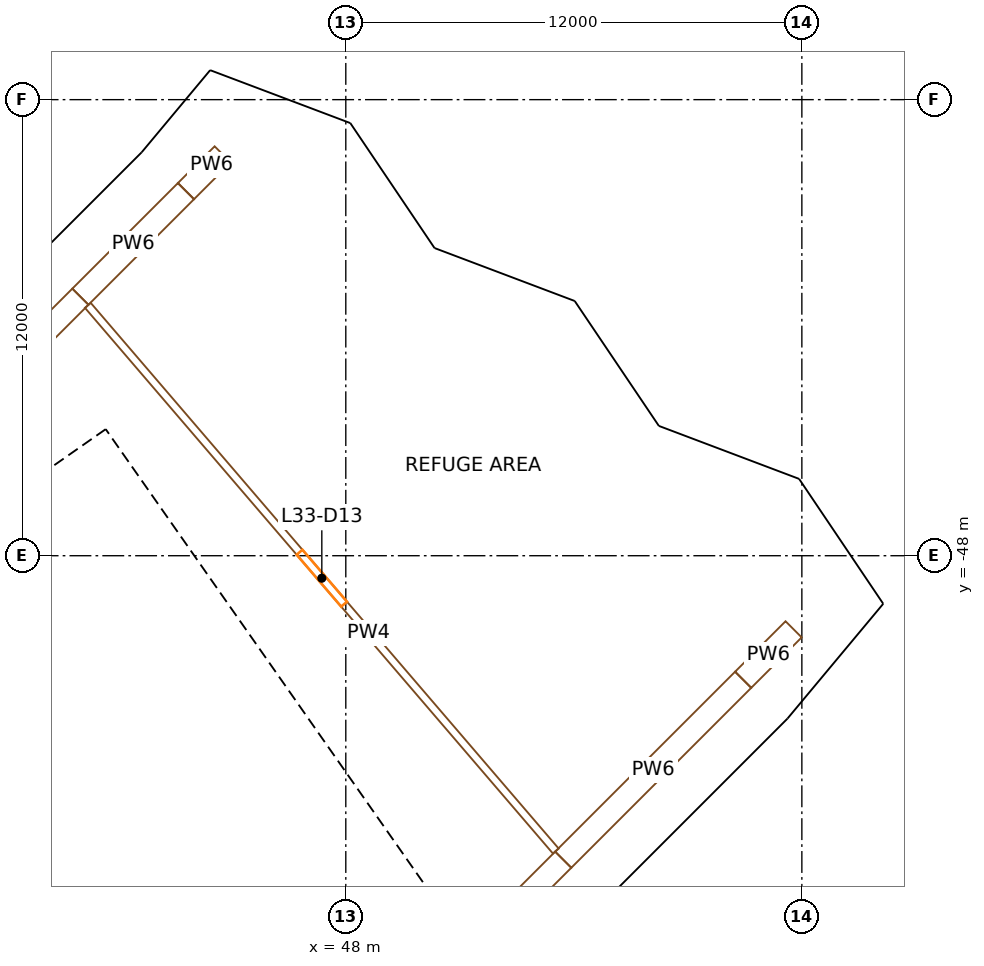
"""IFC4 building model, lengths in metres.
Left out: names, types, materials, properties, quantities, classifications, styles, units other than length and angle.
Written with IfcOpenShell. Run it as: python <this file> out.ifc"""

import sys

from ifc_helpers import new_model, si_unit, direction, frame, frame_2d, origin, origin_2d, place, context, subcontext, project, spatial, rectangle, extrude, element, fill, save


model = new_model("IFC4")
c1 = context("Model", 3, precision=1e-05, world=origin(), true_north=direction((0.0, 1.0)))
c2 = subcontext(c1, "Body", "Model", "MODEL_VIEW")
j1 = project(units=[si_unit("LENGTHUNIT", "METRE"), si_unit("PLANEANGLEUNIT", "RADIAN")], contexts=[c1])
p1 = place(None, origin())
s1 = spatial("IfcSite", under=j1, at=p1, CompositionType="ELEMENT")
p2 = place(p1, origin())
s2 = spatial("IfcBuilding", under=s1, at=p2, CompositionType="ELEMENT")
p3 = place(p2, frame((0.0, 0.0, 144.3)))
s3 = spatial("IfcBuildingStorey", under=s2, at=p3, CompositionType="ELEMENT", Elevation=144.3)
for number, where, z_axis, x_axis in (
    (1, (43.795, -38.407, 0.0), (0.0, 0.0, 1.0), (0.659, 0.752, 0.0)),
    (2, (58.456, -51.264, 0.0), (0.0, 0.0, 1.0), (0.659, 0.752, 0.0)),
):
    element("IfcColumn", number, at=place(p3, frame(where, z_axis=z_axis, x_axis=x_axis)), inside=s3, PredefinedType="COLUMN", context=c2, shape_type="SweptSolid", body=[
        extrude(rectangle(XDim=1.2, YDim=1.5, at=origin_2d()), origin(), (0.0, 0.0, 1.0), 5.0),
    ])
p4 = place(p3, frame((49.779, -57.191, 0.0), z_axis=(0.0, 0.0, 1.0), x_axis=(-0.573577477574, 0.819151315216, 0.0)))
e3 = element("IfcWall", 3, at=p4, inside=s3, PredefinedType="SHEAR", context=c2, shape_type="SweptSolid", body=[
    extrude(rectangle(XDim=14.8, YDim=0.9, at=frame_2d((7.4, 0.0))), origin(), (0.0, 0.0, 1.0), 4.7),
])
p5 = place(p4, frame((6.7, 0.0, 0.0)))
e4 = element("IfcOpeningElement", 4, at=p5, cuts=e3, PredefinedType="OPENING", context=c2, shape_type="SweptSolid", body=[
    extrude(rectangle(XDim=1.4, YDim=2.1, at=frame_2d((0.7, 1.05))), frame((0.0, 0.46, 0.0), z_axis=(0.0, -1.0, 0.0), x_axis=(1.0, 0.0, 0.0)), (0.0, 0.0, 1.0), 0.92),
])
p6 = place(p3, frame((28.854, -54.324, 0.0), z_axis=(0.0, 0.0, 1.0), x_axis=(0.819145767589, 0.573585400304, 0.0)))
e5 = element("IfcWall", 5, at=p6, inside=s3, PredefinedType="SHEAR", context=c2, shape_type="SweptSolid", body=[
    extrude(rectangle(XDim=15.045, YDim=0.9, at=frame_2d((7.523, 0.0))), origin(), (0.0, 0.0, 1.0), 4.7),
])
p7 = place(p6, frame((3.45, 0.0, 0.0)))
e6 = element("IfcOpeningElement", 6, at=p7, cuts=e5, PredefinedType="OPENING", context=c2, shape_type="SweptSolid", body=[
    extrude(rectangle(XDim=1.0, YDim=2.1, at=frame_2d((0.5, 1.05))), frame((0.0, 0.46, 0.0), z_axis=(0.0, -1.0, 0.0), x_axis=(1.0, 0.0, 0.0)), (0.0, 0.0, 1.0), 0.92),
])
p8 = place(p6, frame((13.495, 0.0, 0.0)))
e7 = element("IfcOpeningElement", 7, at=p8, cuts=e5, PredefinedType="OPENING", context=c2, shape_type="SweptSolid", body=[
    extrude(rectangle(XDim=1.1, YDim=2.1, at=frame_2d((0.55, 1.05))), frame((0.0, 0.46, 0.0), z_axis=(0.0, -1.0, 0.0), x_axis=(1.0, 0.0, 0.0)), (0.0, 0.0, 1.0), 0.92),
])
p9 = place(p3, frame((43.204, -60.696, 0.0), z_axis=(0.0, 0.0, 1.0), x_axis=(-0.573571992966, 0.819155155563, 0.0)))
e8 = element("IfcWall", 8, at=p9, inside=s3, PredefinedType="SOLIDWALL", context=c2, shape_type="SweptSolid", body=[
    extrude(rectangle(XDim=13.0, YDim=0.3, at=frame_2d((6.5, 0.0))), origin(), (0.0, 0.0, 1.0), 4.7),
])
p10 = place(p3, frame((38.17, -58.3, 0.0), z_axis=(0.0, 0.0, 1.0), x_axis=(0.819178980414, 0.573537965655, 0.0)))
e9 = element("IfcWall", 9, at=p10, inside=s3, PredefinedType="SOLIDWALL", context=c2, shape_type="SweptSolid", body=[
    extrude(rectangle(XDim=2.6, YDim=0.3, at=frame_2d((1.3, 0.0))), origin(), (0.0, 0.0, 1.0), 4.7),
])
p11 = place(p3, frame((37.936, -52.91, 0.0), z_axis=(0.0, 0.0, 1.0), x_axis=(0.819147518138, 0.57358290031, 0.0)))
e10 = element("IfcWall", 10, at=p11, inside=s3, PredefinedType="SOLIDWALL", context=c2, shape_type="SweptSolid", body=[
    extrude(rectangle(XDim=6.795, YDim=0.3, at=frame_2d((3.398, 0.0))), origin(), (0.0, 0.0, 1.0), 4.7),
])
p12 = place(p11, frame((5.32, 0.0, 0.0)))
e11 = element("IfcOpeningElement", 11, at=p12, cuts=e10, PredefinedType="OPENING", context=c2, shape_type="SweptSolid", body=[
    extrude(rectangle(XDim=1.1, YDim=2.1, at=frame_2d((0.55, 1.05))), frame((0.0, 0.16, 0.0), z_axis=(0.0, -1.0, 0.0), x_axis=(1.0, 0.0, 0.0)), (0.0, 0.0, 1.0), 0.32),
])
p13 = place(p3, frame((41.262, -57.661, 0.0), z_axis=(0.0, 0.0, 1.0), x_axis=(0.819164398642, 0.573558792102, 0.0)))
e12 = element("IfcWall", 12, at=p13, inside=s3, PredefinedType="SOLIDWALL", context=c2, shape_type="SweptSolid", body=[
    extrude(rectangle(XDim=6.795, YDim=0.3, at=frame_2d((3.397, 0.0))), origin(), (0.0, 0.0, 1.0), 4.7),
])
p14 = place(p13, frame((5.32, 0.0, 0.0)))
e13 = element("IfcOpeningElement", 13, at=p14, cuts=e12, PredefinedType="OPENING", context=c2, shape_type="SweptSolid", body=[
    extrude(rectangle(XDim=1.1, YDim=2.1, at=frame_2d((0.55, 1.05))), frame((0.0, 0.16, 0.0), z_axis=(0.0, -1.0, 0.0), x_axis=(1.0, 0.0, 0.0)), (0.0, 0.0, 1.0), 0.32),
])
p15 = place(p3, frame((39.599, -55.285, 0.0), z_axis=(0.0, 0.0, 1.0), x_axis=(0.819136323161, 0.573598887793, 0.0)))
e14 = element("IfcWall", 14, at=p15, inside=s3, PredefinedType="SOLIDWALL", context=c2, shape_type="SweptSolid", body=[
    extrude(rectangle(XDim=3.0, YDim=0.5, at=frame_2d((1.5, 0.0))), origin(), (0.0, 0.0, 1.0), 4.7),
])
p16 = place(p3, frame((43.757, -55.731, 0.0), z_axis=(0.0, 0.0, 1.0), x_axis=(-0.573536818435, 0.819179783625, 0.0)))
e15 = element("IfcWall", 15, at=p16, inside=s3, PredefinedType="SOLIDWALL", context=c2, shape_type="SweptSolid", body=[
    extrude(rectangle(XDim=5.5, YDim=0.3, at=frame_2d((2.75, 0.0))), origin(), (0.0, 0.0, 1.0), 4.7),
])
p17 = place(p16, frame((0.7, 0.0, 0.0)))
e16 = element("IfcOpeningElement", 16, at=p17, cuts=e15, PredefinedType="OPENING", context=c2, shape_type="SweptSolid", body=[
    extrude(rectangle(XDim=1.1, YDim=2.1, at=frame_2d((0.55, 1.05))), frame((0.0, 0.16, 0.0), z_axis=(0.0, -1.0, 0.0), x_axis=(1.0, 0.0, 0.0)), (0.0, 0.0, 1.0), 0.32),
])
p18 = place(p16, frame((3.7, 0.0, 0.0)))
e17 = element("IfcOpeningElement", 17, at=p18, cuts=e15, PredefinedType="OPENING", context=c2, shape_type="SweptSolid", body=[
    extrude(rectangle(XDim=1.1, YDim=2.1, at=frame_2d((0.55, 1.05))), frame((0.0, 0.16, 0.0), z_axis=(0.0, -1.0, 0.0), x_axis=(1.0, 0.0, 0.0)), (0.0, 0.0, 1.0), 0.32),
])
p19 = place(p3, frame((41.3, -47.96, 0.0), z_axis=(0.0, 0.0, 1.0), x_axis=(0.573495128918, -0.819208970354, 0.0)))
e18 = element("IfcWall", 18, at=p19, inside=s3, PredefinedType="SOLIDWALL", context=c2, shape_type="SweptSolid", body=[
    extrude(rectangle(XDim=0.5, YDim=0.3, at=frame_2d((0.25, 0.0))), origin(), (0.0, 0.0, 1.0), 2.3),
])
p20 = place(p3, frame((46.778, -55.782, 0.0), z_axis=(0.0, 0.0, 1.0), x_axis=(0.573822822947, -0.818979467304, 0.0)))
e19 = element("IfcWall", 19, at=p20, inside=s3, PredefinedType="SOLIDWALL", context=c2, shape_type="SweptSolid", body=[
    extrude(rectangle(XDim=0.5, YDim=0.3, at=frame_2d((0.25, 0.0))), origin(), (0.0, 0.0, 1.0), 2.3),
])
p21 = place(p3, frame((61.754, -49.049, 0.0), z_axis=(0.0, 0.0, 1.0), x_axis=(-0.558712749234, 0.82936123845, 0.0)))
e20 = element("IfcWall", 20, at=p21, inside=s3, PredefinedType="SOLIDWALL", context=c2, shape_type="SweptSolid", body=[
    extrude(rectangle(XDim=3.294, YDim=0.4, at=frame_2d((1.647, 0.0))), origin(), (0.0, 0.0, 1.0), 3.6),
])
p22 = place(p3, frame((59.905, -46.184, 0.0), z_axis=(0.0, 0.0, 1.0), x_axis=(-0.935475531187, 0.353391469266, 0.0)))
e21 = element("IfcWall", 21, at=p22, inside=s3, PredefinedType="SOLIDWALL", context=c2, shape_type="SweptSolid", body=[
    extrude(rectangle(XDim=4.174, YDim=0.4, at=frame_2d((2.087, 0.0))), origin(), (0.0, 0.0, 1.0), 3.6),
])
p23 = place(p3, frame((55.99, -44.576, 0.0), z_axis=(0.0, 0.0, 1.0), x_axis=(-0.558746380234, 0.829338581386, 0.0)))
e22 = element("IfcWall", 22, at=p23, inside=s3, PredefinedType="SOLIDWALL", context=c2, shape_type="SweptSolid", body=[
    extrude(rectangle(XDim=3.545, YDim=0.4, at=frame_2d((1.772, 0.0))), origin(), (0.0, 0.0, 1.0), 3.6),
])
p24 = place(p3, frame((54.0, -41.503, 0.0), z_axis=(0.0, 0.0, 1.0), x_axis=(-0.935511628749, 0.353295899319, 0.0)))
e23 = element("IfcWall", 23, at=p24, inside=s3, PredefinedType="SOLIDWALL", context=c2, shape_type="SweptSolid", body=[
    extrude(rectangle(XDim=4.173, YDim=0.4, at=frame_2d((2.086, 0.0))), origin(), (0.0, 0.0, 1.0), 3.6),
])
p25 = place(p3, frame((50.087, -39.896, 0.0), z_axis=(0.0, 0.0, 1.0), x_axis=(-0.558808176672, 0.829296944215, 0.0)))
e24 = element("IfcWall", 24, at=p25, inside=s3, PredefinedType="SOLIDWALL", context=c2, shape_type="SweptSolid", body=[
    extrude(rectangle(XDim=3.546, YDim=0.4, at=frame_2d((1.773, 0.0))), origin(), (0.0, 0.0, 1.0), 3.6),
])
p26 = place(p3, frame((48.096, -36.822, 0.0), z_axis=(0.0, 0.0, 1.0), x_axis=(-0.93554220832, 0.353214915386, 0.0)))
e25 = element("IfcWall", 25, at=p26, inside=s3, PredefinedType="SOLIDWALL", context=c2, shape_type="SweptSolid", body=[
    extrude(rectangle(XDim=4.041, YDim=0.4, at=frame_2d((2.021, 0.0))), origin(), (0.0, 0.0, 1.0), 3.6),
])
p27 = place(p3, frame((42.791, -37.506, 0.0), z_axis=(0.0, 0.0, 1.0), x_axis=(-0.707123092197, -0.7070904698, 0.0)))
e26 = element("IfcWall", 26, at=p27, inside=s3, PredefinedType="SOLIDWALL", context=c2, shape_type="SweptSolid", body=[
    extrude(rectangle(XDim=7.484, YDim=0.4, at=frame_2d((3.742, 0.0))), origin(), (0.0, 0.0, 1.0), 3.6),
])
p28 = place(p3, frame((44.333, -35.655, 0.0), z_axis=(0.0, 0.0, 1.0), x_axis=(-0.640465546818, -0.767986903104, 0.0)))
e27 = element("IfcWall", 27, at=p28, inside=s3, PredefinedType="SOLIDWALL", context=c2, shape_type="SweptSolid", body=[
    extrude(rectangle(XDim=2.391, YDim=0.4, at=frame_2d((1.196, 0.0))), origin(), (0.0, 0.0, 1.0), 3.6),
])
p29 = place(p3, frame((52.19, -59.434, 0.0), z_axis=(0.0, 0.0, 1.0), x_axis=(0.707094885943, 0.70711867623, 0.0)))
e28 = element("IfcWall", 28, at=p29, inside=s3, PredefinedType="SOLIDWALL", context=c2, shape_type="SweptSolid", body=[
    extrude(rectangle(XDim=10.262, YDim=0.4, at=frame_2d((5.131, 0.0))), origin(), (0.0, 0.0, 1.0), 3.6),
])
p30 = place(p3, frame((59.46, -52.167, 0.0), z_axis=(0.0, 0.0, 1.0), x_axis=(0.640521763301, 0.767940017669, 0.0)))
e29 = element("IfcWall", 29, at=p30, inside=s3, PredefinedType="SOLIDWALL", context=c2, shape_type="SweptSolid", body=[
    extrude(rectangle(XDim=3.985, YDim=0.4, at=frame_2d((1.993, 0.0))), origin(), (0.0, 0.0, 1.0), 3.6),
])
p31 = place(p3, frame((38.423, -43.779, 0.0), z_axis=(0.0, 0.0, 1.0), x_axis=(0.707106781187, 0.707106781187, 0.0)))
e30 = element("IfcWall", 30, at=p31, inside=s3, PredefinedType="PARTITIONING", context=c2, shape_type="SweptSolid", body=[
    extrude(rectangle(XDim=3.668, YDim=0.6, at=frame_2d((1.834, 0.0))), origin(), (0.0, 0.0, 1.0), 3.6),
])
p32 = place(p3, frame((41.017, -41.185, 0.0), z_axis=(0.0, 0.0, 1.0), x_axis=(0.707106781187, 0.707106781187, 0.0)))
e31 = element("IfcWall", 31, at=p32, inside=s3, PredefinedType="PARTITIONING", context=c2, shape_type="SweptSolid", body=[
    extrude(rectangle(XDim=3.925, YDim=0.6, at=frame_2d((1.963, 0.0))), origin(), (0.0, 0.0, 1.0), 3.6),
])
p33 = place(p3, frame((41.212, -41.412, 0.0), z_axis=(0.0, 0.0, 1.0), x_axis=(0.650990118882, -0.75908620401, 0.0)))
e32 = element("IfcWall", 32, at=p33, inside=s3, PredefinedType="PARTITIONING", context=c2, shape_type="SweptSolid", body=[
    extrude(rectangle(XDim=18.915, YDim=0.2, at=frame_2d((9.458, 0.0))), origin(), (0.0, 0.0, 1.0), 3.6),
])
p34 = place(p33, frame((8.558, 0.0, 0.0)))
e33 = element("IfcOpeningElement", 33, at=p34, cuts=e32, PredefinedType="OPENING", context=c2, shape_type="SweptSolid", body=[
    extrude(rectangle(XDim=1.8, YDim=2.4, at=frame_2d((0.9, 1.2))), frame((0.0, 0.11, 0.0), z_axis=(0.0, -1.0, 0.0), x_axis=(1.0, 0.0, 0.0)), (0.0, 0.0, 1.0), 0.22),
])
p35 = place(p3, frame((43.797, -38.405, 0.0), z_axis=(0.0, 0.0, 1.0), x_axis=(0.707106781187, 0.707106781187, 0.0)))
e34 = element("IfcWall", 34, at=p35, inside=s3, PredefinedType="PARTITIONING", context=c2, shape_type="SweptSolid", body=[
    extrude(rectangle(XDim=1.364, YDim=0.6, at=frame_2d((0.682, 0.0))), origin(), (0.0, 0.0, 1.0), 3.6),
])
p36 = place(p3, frame((51.28, -58.439, 0.0), z_axis=(0.0, 0.0, 1.0), x_axis=(0.707106781187, 0.707106781187, 0.0)))
e35 = element("IfcWall", 35, at=p36, inside=s3, PredefinedType="PARTITIONING", context=c2, shape_type="SweptSolid", body=[
    extrude(rectangle(XDim=3.452, YDim=0.6, at=frame_2d((1.726, 0.0))), origin(), (0.0, 0.0, 1.0), 3.6),
])
p37 = place(p3, frame((53.721, -55.999, 0.0), z_axis=(0.0, 0.0, 1.0), x_axis=(0.707106781187, 0.707106781187, 0.0)))
e36 = element("IfcWall", 36, at=p37, inside=s3, PredefinedType="PARTITIONING", context=c2, shape_type="SweptSolid", body=[
    extrude(rectangle(XDim=6.692, YDim=0.6, at=frame_2d((3.346, 0.0))), origin(), (0.0, 0.0, 1.0), 3.6),
])
p38 = place(p3, frame((58.458, -51.262, 0.0), z_axis=(0.0, 0.0, 1.0), x_axis=(0.707041637073, 0.707171919299, 0.0)))
e37 = element("IfcWall", 37, at=p38, inside=s3, PredefinedType="PARTITIONING", context=c2, shape_type="SweptSolid", body=[
    extrude(rectangle(XDim=1.874, YDim=0.6, at=frame_2d((0.937, 0.0))), origin(), (0.0, 0.0, 1.0), 3.6),
])
p39 = place(p17, origin())
e38 = element("IfcDoor", 38, at=p39, inside=s3, OperationType="DOUBLE_DOOR_SLIDING", PredefinedType="DOOR", context=c2, shape_type="SweptSolid", body=[
    extrude(rectangle(XDim=1.1, YDim=2.1, at=frame_2d((0.55, 1.05))), frame((0.0, 0.025, 0.0), z_axis=(0.0, -1.0, 0.0), x_axis=(1.0, 0.0, 0.0)), (0.0, 0.0, 1.0), 0.05),
])
fill(e16, e38)
p40 = place(p18, origin())
e39 = element("IfcDoor", 39, at=p40, inside=s3, OperationType="DOUBLE_DOOR_SLIDING", PredefinedType="DOOR", context=c2, shape_type="SweptSolid", body=[
    extrude(rectangle(XDim=1.1, YDim=2.1, at=frame_2d((0.55, 1.05))), frame((0.0, 0.025, 0.0), z_axis=(0.0, -1.0, 0.0), x_axis=(1.0, 0.0, 0.0)), (0.0, 0.0, 1.0), 0.05),
])
fill(e17, e39)
p41 = place(p5, origin())
e40 = element("IfcDoor", 40, at=p41, inside=s3, OperationType="DOUBLE_DOOR_SINGLE_SWING", PredefinedType="DOOR", context=c2, shape_type="SweptSolid", body=[
    extrude(rectangle(XDim=1.4, YDim=2.1, at=frame_2d((0.7, 1.05))), frame((0.0, 0.025, 0.0), z_axis=(0.0, -1.0, 0.0), x_axis=(1.0, 0.0, 0.0)), (0.0, 0.0, 1.0), 0.05),
])
fill(e4, e40)
p42 = place(p8, origin())
e41 = element("IfcDoor", 41, at=p42, inside=s3, OperationType="SINGLE_SWING_RIGHT", PredefinedType="DOOR", context=c2, shape_type="SweptSolid", body=[
    extrude(rectangle(XDim=1.1, YDim=2.1, at=frame_2d((0.55, 1.05))), frame((0.0, 0.025, 0.0), z_axis=(0.0, -1.0, 0.0), x_axis=(1.0, 0.0, 0.0)), (0.0, 0.0, 1.0), 0.05),
])
fill(e7, e41)
p43 = place(p12, origin())
e42 = element("IfcDoor", 42, at=p43, inside=s3, OperationType="SINGLE_SWING_LEFT", PredefinedType="DOOR", context=c2, shape_type="SweptSolid", body=[
    extrude(rectangle(XDim=1.1, YDim=2.1, at=frame_2d((0.55, 1.05))), frame((0.0, 0.025, 0.0), z_axis=(0.0, -1.0, 0.0), x_axis=(1.0, 0.0, 0.0)), (0.0, 0.0, 1.0), 0.05),
])
fill(e11, e42)
p44 = place(p14, origin())
e43 = element("IfcDoor", 43, at=p44, inside=s3, OperationType="SINGLE_SWING_LEFT", PredefinedType="DOOR", context=c2, shape_type="SweptSolid", body=[
    extrude(rectangle(XDim=1.1, YDim=2.1, at=frame_2d((0.55, 1.05))), frame((0.0, 0.025, 0.0), z_axis=(0.0, -1.0, 0.0), x_axis=(1.0, 0.0, 0.0)), (0.0, 0.0, 1.0), 0.05),
])
fill(e13, e43)
p45 = place(p34, origin())
e44 = element("IfcDoor", 44, at=p45, inside=s3, OperationType="DOUBLE_DOOR_SINGLE_SWING", PredefinedType="DOOR", context=c2, shape_type="SweptSolid", body=[
    extrude(rectangle(XDim=1.8, YDim=2.4, at=frame_2d((0.9, 1.2))), frame((0.0, 0.025, 0.0), z_axis=(0.0, -1.0, 0.0), x_axis=(1.0, 0.0, 0.0)), (0.0, 0.0, 1.0), 0.05),
])
fill(e33, e44)
save(model, sys.argv[1])
